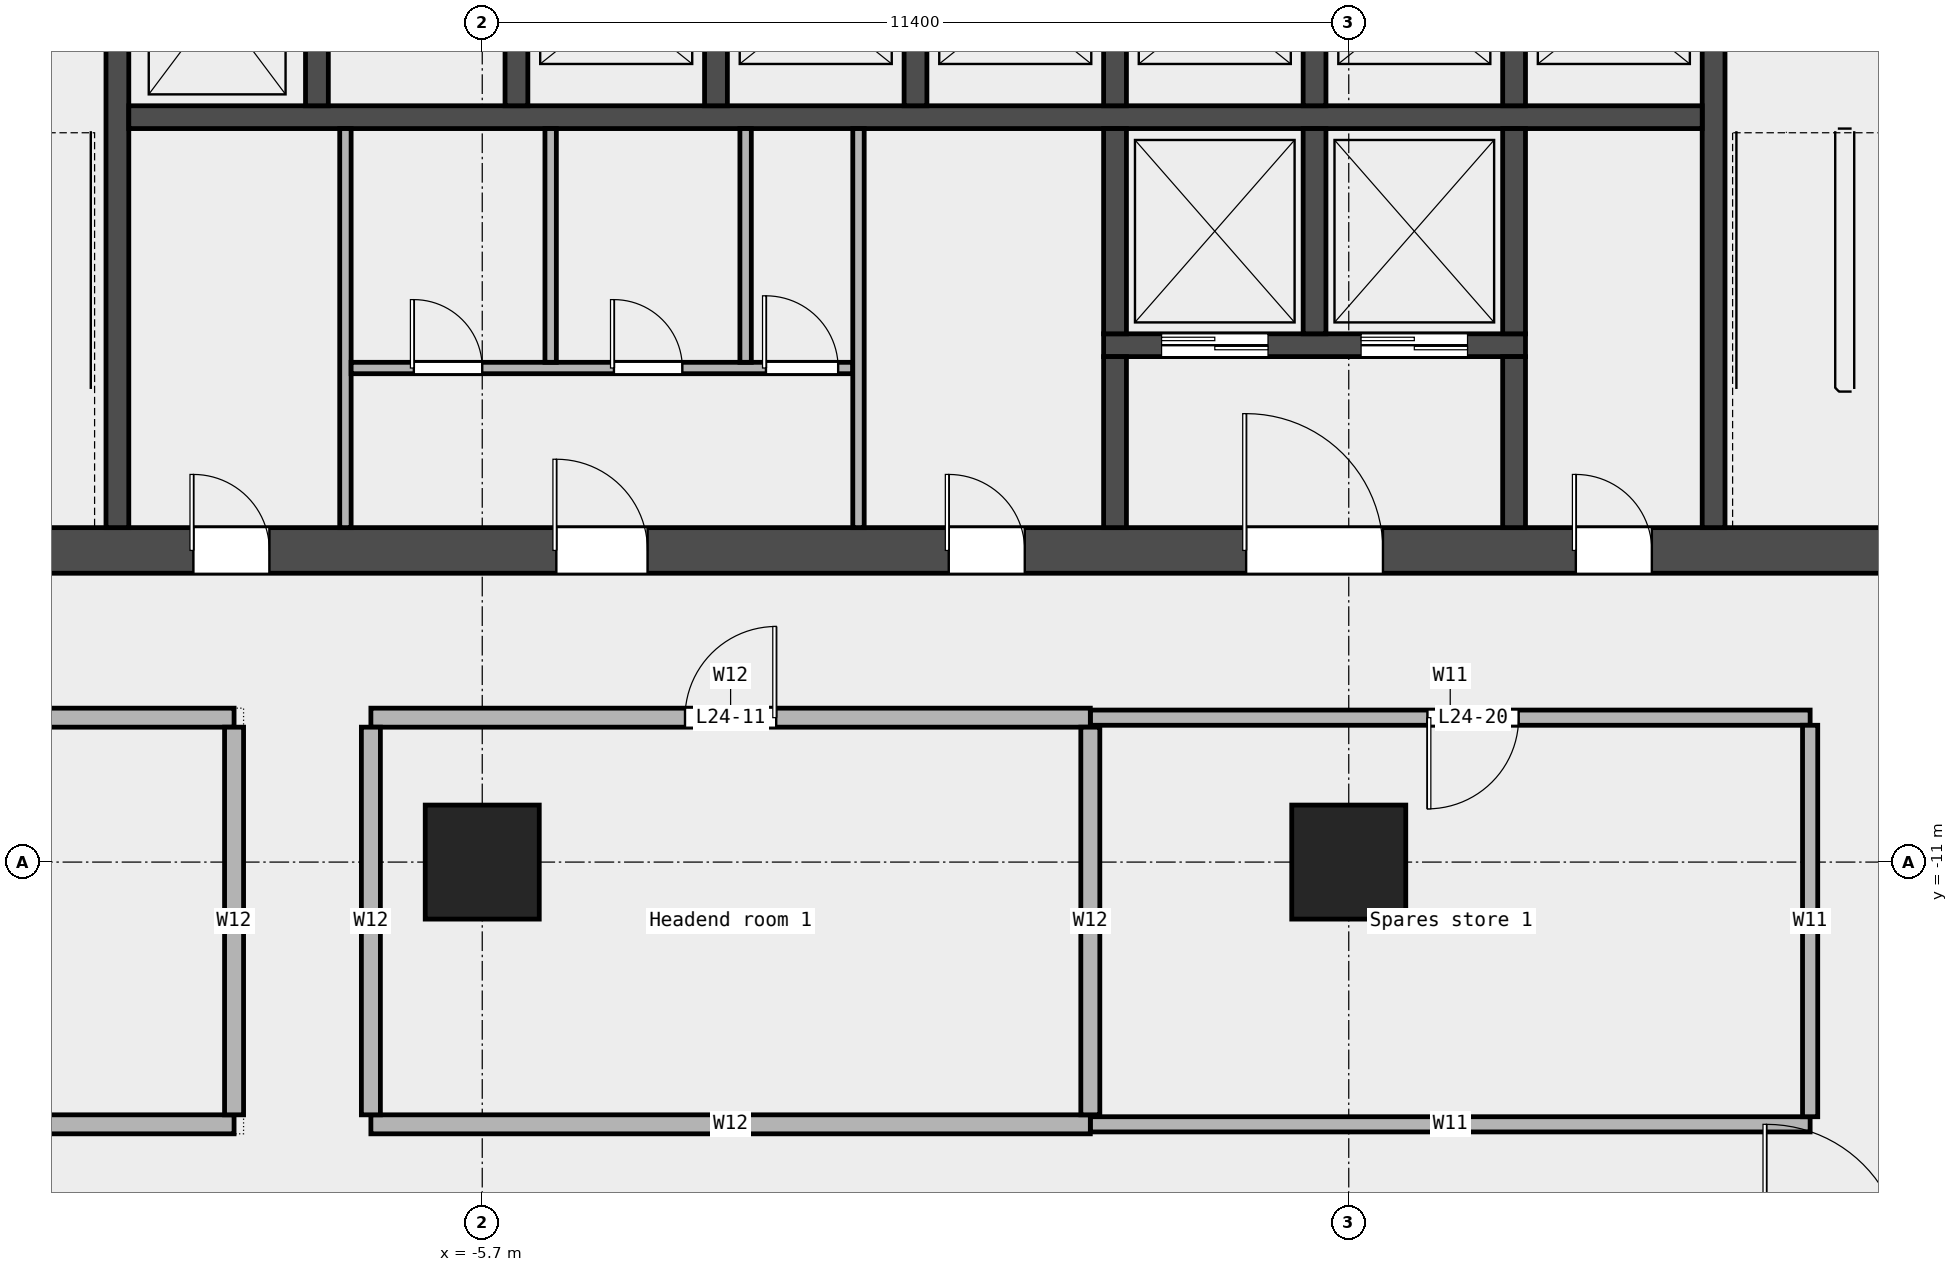
"""IFC4 building model, lengths in metres.
Left out: names, types, materials, properties, quantities, classifications, styles, units other than length and angle.
Written with IfcOpenShell. Run it as: python <this file> out.ifc"""

import sys

from ifc_helpers import new_model, si_unit, direction, frame, frame_2d, origin, origin_2d, place, context, subcontext, project, spatial, rectangle, extrude, element, fill, save


model = new_model("IFC4")
c1 = context("Model", 3, precision=1e-05, world=origin(), true_north=direction((0.0, 1.0)))
c2 = subcontext(c1, "Body", "Model", "MODEL_VIEW")
j1 = project(units=[si_unit("LENGTHUNIT", "METRE"), si_unit("PLANEANGLEUNIT", "RADIAN")], contexts=[c1])
p1 = place(None, origin())
s1 = spatial("IfcSite", under=j1, at=p1, CompositionType="ELEMENT")
p2 = place(p1, origin())
s2 = spatial("IfcBuilding", under=s1, at=p2, CompositionType="ELEMENT")
p3 = place(p2, frame((0.0, 0.0, 121.6)))
s3 = spatial("IfcBuildingStorey", under=s2, at=p3, CompositionType="ELEMENT", Elevation=121.6)
for number, where, z_axis, x_axis in (
    (1, (-5.7, -11.0, 0.0), (0.0, 0.0, 1.0), (1.0, 0.0, 0.0)),
    (2, (5.7, -11.0, 0.0), (0.0, 0.0, 1.0), (1.0, 0.0, 0.0)),
):
    element("IfcColumn", number, at=place(p3, frame(where, z_axis=z_axis, x_axis=x_axis)), inside=s3, PredefinedType="COLUMN", context=c2, shape_type="SweptSolid", body=[
        extrude(rectangle(XDim=1.5, YDim=1.5, at=origin_2d()), origin(), (0.0, 0.0, 1.0), 4.05),
    ])
p4 = place(p3, frame((2.3, -14.45, 0.0), z_axis=(0.0, 0.0, 1.0), x_axis=(1.0, 0.0, 0.0)))
e3 = element("IfcWall", 3, at=p4, inside=s3, PredefinedType="PARTITIONING", context=c2, shape_type="SweptSolid", body=[
    extrude(rectangle(XDim=9.47, YDim=0.2, at=frame_2d((4.735, 0.0))), origin(), (0.0, 0.0, 1.0), 4.05),
])
p5 = place(p3, frame((-15.9, -14.45, 0.0), z_axis=(0.0, 0.0, 1.0), x_axis=(1.0, 0.0, 0.0)))
e4 = element("IfcWall", 4, at=p5, inside=s3, PredefinedType="PARTITIONING", context=c2, shape_type="SweptSolid", body=[
    extrude(rectangle(XDim=6.935, YDim=0.25, at=frame_2d((3.467, 0.0))), origin(), (0.0, 0.0, 1.0), 4.05),
])
p6 = place(p3, frame((-7.165, -14.45, 0.0), z_axis=(0.0, 0.0, 1.0), x_axis=(1.0, 0.0, 0.0)))
e5 = element("IfcWall", 5, at=p6, inside=s3, PredefinedType="PARTITIONING", context=c2, shape_type="SweptSolid", body=[
    extrude(rectangle(XDim=9.465, YDim=0.25, at=frame_2d((4.732, 0.0))), origin(), (0.0, 0.0, 1.0), 4.05),
])
p7 = place(p3, frame((2.3, -9.1, 0.0), z_axis=(0.0, 0.0, 1.0), x_axis=(1.0, 0.0, 0.0)))
e6 = element("IfcWall", 6, at=p7, inside=s3, PredefinedType="PARTITIONING", context=c2, shape_type="SweptSolid", body=[
    extrude(rectangle(XDim=9.47, YDim=0.2, at=frame_2d((4.735, 0.0))), origin(), (0.0, 0.0, 1.0), 4.05),
])
p8 = place(p7, frame((4.435, 0.0, 0.0)))
e7 = element("IfcOpeningElement", 7, at=p8, cuts=e6, PredefinedType="OPENING", context=c2, shape_type="SweptSolid", body=[
    extrude(rectangle(XDim=1.2, YDim=2.1, at=frame_2d((0.6, 1.05))), frame((0.0, 0.112, 0.0), z_axis=(0.0, -1.0, 0.0), x_axis=(1.0, 0.0, 0.0)), (0.0, 0.0, 1.0), 0.224),
])
p9 = place(p3, frame((-15.9, -9.1, 0.0), z_axis=(0.0, 0.0, 1.0), x_axis=(1.0, 0.0, 0.0)))
e8 = element("IfcWall", 8, at=p9, inside=s3, PredefinedType="PARTITIONING", context=c2, shape_type="SweptSolid", body=[
    extrude(rectangle(XDim=6.935, YDim=0.25, at=frame_2d((3.467, 0.0))), origin(), (0.0, 0.0, 1.0), 4.05),
])
p10 = place(p9, frame((3.018, 0.0, 0.0)))
e9 = element("IfcOpeningElement", 9, at=p10, cuts=e8, PredefinedType="OPENING", context=c2, shape_type="SweptSolid", body=[
    extrude(rectangle(XDim=0.9, YDim=2.1, at=frame_2d((0.45, 1.05))), frame((0.0, 0.137, 0.0), z_axis=(0.0, -1.0, 0.0), x_axis=(1.0, 0.0, 0.0)), (0.0, 0.0, 1.0), 0.274),
])
p11 = place(p3, frame((-7.165, -9.1, 0.0), z_axis=(0.0, 0.0, 1.0), x_axis=(1.0, 0.0, 0.0)))
e10 = element("IfcWall", 10, at=p11, inside=s3, PredefinedType="PARTITIONING", context=c2, shape_type="SweptSolid", body=[
    extrude(rectangle(XDim=9.465, YDim=0.25, at=frame_2d((4.732, 0.0))), origin(), (0.0, 0.0, 1.0), 4.05),
])
p12 = place(p11, frame((4.133, 0.0, 0.0)))
e11 = element("IfcOpeningElement", 11, at=p12, cuts=e10, PredefinedType="OPENING", context=c2, shape_type="SweptSolid", body=[
    extrude(rectangle(XDim=1.2, YDim=2.1, at=frame_2d((0.6, 1.05))), frame((0.0, 0.137, 0.0), z_axis=(0.0, -1.0, 0.0), x_axis=(1.0, 0.0, 0.0)), (0.0, 0.0, 1.0), 0.274),
])
for number, where, z_axis, x_axis in (
    (12, (-8.965, -14.325, 0.0), (0.0, 0.0, 1.0), (0.0, 1.0, 0.0)),
    (13, (-7.165, -14.325, 0.0), (0.0, 0.0, 1.0), (0.0, 1.0, 0.0)),
    (14, (2.3, -14.325, 0.0), (0.0, 0.0, 1.0), (0.0, 1.0, 0.0)),
):
    element("IfcWall", number, at=place(p3, frame(where, z_axis=z_axis, x_axis=x_axis)), inside=s3, PredefinedType="PARTITIONING", context=c2, shape_type="SweptSolid", body=[
        extrude(rectangle(XDim=5.1, YDim=0.25, at=frame_2d((2.55, 0.0))), origin(), (0.0, 0.0, 1.0), 4.05),
    ])
p13 = place(p3, frame((11.77, -14.35, 0.0), z_axis=(0.0, 0.0, 1.0), x_axis=(0.0, 1.0, 0.0)))
e15 = element("IfcWall", 15, at=p13, inside=s3, PredefinedType="PARTITIONING", context=c2, shape_type="SweptSolid", body=[
    extrude(rectangle(XDim=5.15, YDim=0.2, at=frame_2d((2.575, 0.0))), origin(), (0.0, 0.0, 1.0), 4.05),
])
p14 = place(p3, frame((-14.4, -6.9, 0.0), z_axis=(0.0, 0.0, 1.0), x_axis=(1.0, 0.0, 0.0)))
e16 = element("IfcWall", 16, at=p14, inside=s3, PredefinedType="SHEAR", context=c2, shape_type="SweptSolid", body=[
    extrude(rectangle(XDim=28.8, YDim=0.6, at=frame_2d((14.4, 0.0))), origin(), (0.0, 0.0, 1.0), 4.2),
])
p15 = place(p14, frame((4.9, 0.0, 0.0)))
e17 = element("IfcOpeningElement", 17, at=p15, cuts=e16, PredefinedType="OPENING", context=c2, shape_type="SweptSolid", body=[
    extrude(rectangle(XDim=1.0, YDim=2.1, at=frame_2d((0.5, 1.05))), frame((0.0, 0.312, 0.0), z_axis=(0.0, -1.0, 0.0), x_axis=(1.0, 0.0, 0.0)), (0.0, 0.0, 1.0), 0.624),
])
p16 = place(p14, frame((9.675, 0.0, 0.0)))
e18 = element("IfcOpeningElement", 18, at=p16, cuts=e16, PredefinedType="OPENING", context=c2, shape_type="SweptSolid", body=[
    extrude(rectangle(XDim=1.2, YDim=2.1, at=frame_2d((0.6, 1.05))), frame((0.0, 0.312, 0.0), z_axis=(0.0, -1.0, 0.0), x_axis=(1.0, 0.0, 0.0)), (0.0, 0.0, 1.0), 0.624),
])
p17 = place(p14, frame((14.837, 0.0, 0.0)))
e19 = element("IfcOpeningElement", 19, at=p17, cuts=e16, PredefinedType="OPENING", context=c2, shape_type="SweptSolid", body=[
    extrude(rectangle(XDim=1.0, YDim=2.1, at=frame_2d((0.5, 1.05))), frame((0.0, 0.312, 0.0), z_axis=(0.0, -1.0, 0.0), x_axis=(1.0, 0.0, 0.0)), (0.0, 0.0, 1.0), 0.624),
])
p18 = place(p14, frame((18.75, 0.0, 0.0)))
e20 = element("IfcOpeningElement", 20, at=p18, cuts=e16, PredefinedType="OPENING", context=c2, shape_type="SweptSolid", body=[
    extrude(rectangle(XDim=1.8, YDim=2.1, at=frame_2d((0.9, 1.05))), frame((0.0, 0.312, 0.0), z_axis=(0.0, -1.0, 0.0), x_axis=(1.0, 0.0, 0.0)), (0.0, 0.0, 1.0), 0.624),
])
p19 = place(p14, frame((23.087, 0.0, 0.0)))
e21 = element("IfcOpeningElement", 21, at=p19, cuts=e16, PredefinedType="OPENING", context=c2, shape_type="SweptSolid", body=[
    extrude(rectangle(XDim=1.0, YDim=2.1, at=frame_2d((0.5, 1.05))), frame((0.0, 0.312, 0.0), z_axis=(0.0, -1.0, 0.0), x_axis=(1.0, 0.0, 0.0)), (0.0, 0.0, 1.0), 0.624),
])
for number, where, z_axis, x_axis in (
    (22, (-10.5, -6.6, 0.0), (0.0, 0.0, 1.0), (0.0, 1.0, 0.0)),
    (23, (10.5, -6.6, 0.0), (0.0, 0.0, 1.0), (0.0, 1.0, 0.0)),
):
    element("IfcWall", number, at=place(p3, frame(where, z_axis=z_axis, x_axis=x_axis)), inside=s3, PredefinedType="SHEAR", context=c2, shape_type="SweptSolid", body=[
        extrude(rectangle(XDim=8.55, YDim=0.3, at=frame_2d((4.275, 0.0))), origin(), (0.0, 0.0, 1.0), 4.2),
    ])
p20 = place(p3, frame((-10.35, -1.2, 0.0), z_axis=(0.0, 0.0, 1.0), x_axis=(1.0, 0.0, 0.0)))
e24 = element("IfcWall", 24, at=p20, inside=s3, PredefinedType="SOLIDWALL", context=c2, shape_type="SweptSolid", body=[
    extrude(rectangle(XDim=20.7, YDim=0.3, at=frame_2d((10.35, 0.0))), origin(), (0.0, 0.0, 1.0), 4.2),
])
for number, where, z_axis, x_axis in (
    (25, (-7.875, -1.05, 0.0), (0.0, 0.0, 1.0), (0.0, 1.0, 0.0)),
    (26, (-5.25, -1.05, 0.0), (0.0, 0.0, 1.0), (0.0, 1.0, 0.0)),
    (27, (-2.625, -1.05, 0.0), (0.0, 0.0, 1.0), (0.0, 1.0, 0.0)),
    (28, (0.0, -1.05, 0.0), (0.0, 0.0, 1.0), (0.0, 1.0, 0.0)),
    (29, (2.625, -1.05, 0.0), (0.0, 0.0, 1.0), (0.0, 1.0, 0.0)),
    (30, (5.25, -1.05, 0.0), (0.0, 0.0, 1.0), (0.0, 1.0, 0.0)),
    (31, (7.875, -1.05, 0.0), (0.0, 0.0, 1.0), (0.0, 1.0, 0.0)),
):
    element("IfcWall", number, at=place(p3, frame(where, z_axis=z_axis, x_axis=x_axis)), inside=s3, PredefinedType="SOLIDWALL", context=c2, shape_type="SweptSolid", body=[
        extrude(rectangle(XDim=2.7, YDim=0.3, at=frame_2d((1.35, 0.0))), origin(), (0.0, 0.0, 1.0), 4.2),
    ])
p21 = place(p3, frame((2.475, -4.2, 0.0), z_axis=(0.0, 0.0, 1.0), x_axis=(1.0, 0.0, 0.0)))
e32 = element("IfcWall", 32, at=p21, inside=s3, PredefinedType="SOLIDWALL", context=c2, shape_type="SweptSolid", body=[
    extrude(rectangle(XDim=5.55, YDim=0.3, at=frame_2d((2.775, 0.0))), origin(), (0.0, 0.0, 1.0), 4.2),
])
p22 = place(p21, frame((0.762, 0.0, 0.0)))
e33 = element("IfcOpeningElement", 33, at=p22, cuts=e32, PredefinedType="OPENING", context=c2, shape_type="SweptSolid", body=[
    extrude(rectangle(XDim=1.4, YDim=2.1, at=frame_2d((0.7, 1.05))), frame((0.0, 0.162, 0.0), z_axis=(0.0, -1.0, 0.0), x_axis=(1.0, 0.0, 0.0)), (0.0, 0.0, 1.0), 0.324),
])
p23 = place(p21, frame((3.387, 0.0, 0.0)))
e34 = element("IfcOpeningElement", 34, at=p23, cuts=e32, PredefinedType="OPENING", context=c2, shape_type="SweptSolid", body=[
    extrude(rectangle(XDim=1.4, YDim=2.1, at=frame_2d((0.7, 1.05))), frame((0.0, 0.162, 0.0), z_axis=(0.0, -1.0, 0.0), x_axis=(1.0, 0.0, 0.0)), (0.0, 0.0, 1.0), 0.324),
])
p24 = place(p3, frame((2.625, -4.05, 0.0), z_axis=(0.0, 0.0, 1.0), x_axis=(0.0, 1.0, 0.0)))
e35 = element("IfcWall", 35, at=p24, inside=s3, PredefinedType="SOLIDWALL", context=c2, shape_type="SweptSolid", body=[
    extrude(rectangle(XDim=2.7, YDim=0.3, at=frame_2d((1.35, 0.0))), origin(), (0.0, 0.0, 1.0), 4.2),
])
p25 = place(p3, frame((2.625, -6.6, 0.0), z_axis=(0.0, 0.0, 1.0), x_axis=(0.0, 1.0, 0.0)))
e36 = element("IfcWall", 36, at=p25, inside=s3, PredefinedType="SOLIDWALL", context=c2, shape_type="SweptSolid", body=[
    extrude(rectangle(XDim=2.25, YDim=0.3, at=frame_2d((1.125, 0.0))), origin(), (0.0, 0.0, 1.0), 4.2),
])
for number, where, z_axis, x_axis in (
    (37, (5.25, -4.05, 0.0), (0.0, 0.0, 1.0), (0.0, 1.0, 0.0)),
    (38, (7.875, -4.05, 0.0), (0.0, 0.0, 1.0), (0.0, 1.0, 0.0)),
):
    element("IfcWall", number, at=place(p3, frame(where, z_axis=z_axis, x_axis=x_axis)), inside=s3, PredefinedType="SOLIDWALL", context=c2, shape_type="SweptSolid", body=[
        extrude(rectangle(XDim=2.7, YDim=0.3, at=frame_2d((1.35, 0.0))), origin(), (0.0, 0.0, 1.0), 4.2),
    ])
p26 = place(p3, frame((7.875, -6.6, 0.0), z_axis=(0.0, 0.0, 1.0), x_axis=(0.0, 1.0, 0.0)))
e39 = element("IfcWall", 39, at=p26, inside=s3, PredefinedType="SOLIDWALL", context=c2, shape_type="SweptSolid", body=[
    extrude(rectangle(XDim=2.25, YDim=0.3, at=frame_2d((1.125, 0.0))), origin(), (0.0, 0.0, 1.0), 4.2),
])
p27 = place(p3, frame((-7.5, -6.6, 0.0), z_axis=(0.0, 0.0, 1.0), x_axis=(0.0, 1.0, 0.0)))
e40 = element("IfcWall", 40, at=p27, inside=s3, PredefinedType="PARTITIONING", context=c2, shape_type="SweptSolid", body=[
    extrude(rectangle(XDim=5.25, YDim=0.15, at=frame_2d((2.625, 0.0))), origin(), (0.0, 0.0, 1.0), 4.2),
])
p28 = place(p3, frame((-7.425, -4.5, 0.0), z_axis=(0.0, 0.0, 1.0), x_axis=(1.0, 0.0, 0.0)))
e41 = element("IfcWall", 41, at=p28, inside=s3, PredefinedType="PARTITIONING", context=c2, shape_type="SweptSolid", body=[
    extrude(rectangle(XDim=6.6, YDim=0.15, at=frame_2d((3.3, 0.0))), origin(), (0.0, 0.0, 1.0), 4.2),
])
p29 = place(p28, frame((0.825, 0.0, 0.0)))
e42 = element("IfcOpeningElement", 42, at=p29, cuts=e41, PredefinedType="OPENING", context=c2, shape_type="SweptSolid", body=[
    extrude(rectangle(XDim=0.9, YDim=2.1, at=frame_2d((0.45, 1.05))), frame((0.0, 0.087, 0.0), z_axis=(0.0, -1.0, 0.0), x_axis=(1.0, 0.0, 0.0)), (0.0, 0.0, 1.0), 0.174),
])
p30 = place(p28, frame((3.458, 0.0, 0.0)))
e43 = element("IfcOpeningElement", 43, at=p30, cuts=e41, PredefinedType="OPENING", context=c2, shape_type="SweptSolid", body=[
    extrude(rectangle(XDim=0.9, YDim=2.1, at=frame_2d((0.45, 1.05))), frame((0.0, 0.087, 0.0), z_axis=(0.0, -1.0, 0.0), x_axis=(1.0, 0.0, 0.0)), (0.0, 0.0, 1.0), 0.174),
])
p31 = place(p28, frame((5.458, 0.0, 0.0)))
e44 = element("IfcOpeningElement", 44, at=p31, cuts=e41, PredefinedType="OPENING", context=c2, shape_type="SweptSolid", body=[
    extrude(rectangle(XDim=0.95, YDim=2.1, at=frame_2d((0.475, 1.05))), frame((0.0, 0.087, 0.0), z_axis=(0.0, -1.0, 0.0), x_axis=(1.0, 0.0, 0.0)), (0.0, 0.0, 1.0), 0.174),
])
for number, where, z_axis, x_axis in (
    (45, (-4.8, -4.425, 0.0), (0.0, 0.0, 1.0), (0.0, 1.0, 0.0)),
    (46, (-2.235, -4.425, 0.0), (0.0, 0.0, 1.0), (0.0, 1.0, 0.0)),
):
    element("IfcWall", number, at=place(p3, frame(where, z_axis=z_axis, x_axis=x_axis)), inside=s3, PredefinedType="PARTITIONING", context=c2, shape_type="SweptSolid", body=[
        extrude(rectangle(XDim=3.075, YDim=0.15, at=frame_2d((1.538, 0.0))), origin(), (0.0, 0.0, 1.0), 4.2),
    ])
p32 = place(p3, frame((-0.75, -6.6, 0.0), z_axis=(0.0, 0.0, 1.0), x_axis=(0.0, 1.0, 0.0)))
e47 = element("IfcWall", 47, at=p32, inside=s3, PredefinedType="PARTITIONING", context=c2, shape_type="SweptSolid", body=[
    extrude(rectangle(XDim=5.25, YDim=0.15, at=frame_2d((2.625, 0.0))), origin(), (0.0, 0.0, 1.0), 4.2),
])
p33 = place(p12, origin())
e48 = element("IfcDoor", 48, at=p33, inside=s3, OperationType="SINGLE_SWING_RIGHT", PredefinedType="DOOR", context=c2, shape_type="SweptSolid", body=[
    extrude(rectangle(XDim=1.2, YDim=2.1, at=frame_2d((0.6, 1.05))), frame((0.0, 0.025, 0.0), z_axis=(0.0, -1.0, 0.0), x_axis=(1.0, 0.0, 0.0)), (0.0, 0.0, 1.0), 0.05),
])
fill(e11, e48)
p34 = place(p8, origin())
e49 = element("IfcDoor", 49, at=p34, inside=s3, OperationType="SINGLE_SWING_RIGHT", PredefinedType="DOOR", context=c2, shape_type="SweptSolid", body=[
    extrude(rectangle(XDim=1.2, YDim=2.1, at=frame_2d((0.6, 1.05))), frame((0.0, 0.025, 0.0), z_axis=(0.0, -1.0, 0.0), x_axis=(1.0, 0.0, 0.0)), (0.0, 0.0, 1.0), 0.05),
])
fill(e7, e49)
p35 = place(p22, origin())
e50 = element("IfcDoor", 50, at=p35, inside=s3, OperationType="DOUBLE_DOOR_SLIDING", PredefinedType="DOOR", context=c2, shape_type="SweptSolid", body=[
    extrude(rectangle(XDim=1.4, YDim=2.1, at=frame_2d((0.7, 1.05))), frame((0.0, 0.025, 0.0), z_axis=(0.0, -1.0, 0.0), x_axis=(1.0, 0.0, 0.0)), (0.0, 0.0, 1.0), 0.05),
])
fill(e33, e50)
p36 = place(p23, origin())
e51 = element("IfcDoor", 51, at=p36, inside=s3, OperationType="DOUBLE_DOOR_SLIDING", PredefinedType="DOOR", context=c2, shape_type="SweptSolid", body=[
    extrude(rectangle(XDim=1.4, YDim=2.1, at=frame_2d((0.7, 1.05))), frame((0.0, 0.025, 0.0), z_axis=(0.0, -1.0, 0.0), x_axis=(1.0, 0.0, 0.0)), (0.0, 0.0, 1.0), 0.05),
])
fill(e34, e51)
p37 = place(p15, origin())
e52 = element("IfcDoor", 52, at=p37, inside=s3, OperationType="SINGLE_SWING_LEFT", PredefinedType="DOOR", context=c2, shape_type="SweptSolid", body=[
    extrude(rectangle(XDim=1.0, YDim=2.1, at=frame_2d((0.5, 1.05))), frame((0.0, 0.025, 0.0), z_axis=(0.0, -1.0, 0.0), x_axis=(1.0, 0.0, 0.0)), (0.0, 0.0, 1.0), 0.05),
])
fill(e17, e52)
p38 = place(p16, origin())
e53 = element("IfcDoor", 53, at=p38, inside=s3, OperationType="SINGLE_SWING_LEFT", PredefinedType="DOOR", context=c2, shape_type="SweptSolid", body=[
    extrude(rectangle(XDim=1.2, YDim=2.1, at=frame_2d((0.6, 1.05))), frame((0.0, 0.025, 0.0), z_axis=(0.0, -1.0, 0.0), x_axis=(1.0, 0.0, 0.0)), (0.0, 0.0, 1.0), 0.05),
])
fill(e18, e53)
p39 = place(p29, origin())
e54 = element("IfcDoor", 54, at=p39, inside=s3, OperationType="SINGLE_SWING_LEFT", PredefinedType="DOOR", context=c2, shape_type="SweptSolid", body=[
    extrude(rectangle(XDim=0.9, YDim=2.1, at=frame_2d((0.45, 1.05))), frame((0.0, 0.025, 0.0), z_axis=(0.0, -1.0, 0.0), x_axis=(1.0, 0.0, 0.0)), (0.0, 0.0, 1.0), 0.05),
])
fill(e42, e54)
p40 = place(p30, origin())
e55 = element("IfcDoor", 55, at=p40, inside=s3, OperationType="SINGLE_SWING_LEFT", PredefinedType="DOOR", context=c2, shape_type="SweptSolid", body=[
    extrude(rectangle(XDim=0.9, YDim=2.1, at=frame_2d((0.45, 1.05))), frame((0.0, 0.025, 0.0), z_axis=(0.0, -1.0, 0.0), x_axis=(1.0, 0.0, 0.0)), (0.0, 0.0, 1.0), 0.05),
])
fill(e43, e55)
p41 = place(p31, origin())
e56 = element("IfcDoor", 56, at=p41, inside=s3, OperationType="SINGLE_SWING_LEFT", PredefinedType="DOOR", context=c2, shape_type="SweptSolid", body=[
    extrude(rectangle(XDim=0.95, YDim=2.1, at=frame_2d((0.475, 1.05))), frame((0.0, 0.025, 0.0), z_axis=(0.0, -1.0, 0.0), x_axis=(1.0, 0.0, 0.0)), (0.0, 0.0, 1.0), 0.05),
])
fill(e44, e56)
p42 = place(p17, origin())
e57 = element("IfcDoor", 57, at=p42, inside=s3, OperationType="SINGLE_SWING_LEFT", PredefinedType="DOOR", context=c2, shape_type="SweptSolid", body=[
    extrude(rectangle(XDim=1.0, YDim=2.1, at=frame_2d((0.5, 1.05))), frame((0.0, 0.025, 0.0), z_axis=(0.0, -1.0, 0.0), x_axis=(1.0, 0.0, 0.0)), (0.0, 0.0, 1.0), 0.05),
])
fill(e19, e57)
p43 = place(p18, origin())
e58 = element("IfcDoor", 58, at=p43, inside=s3, OperationType="DOUBLE_DOOR_SINGLE_SWING", PredefinedType="DOOR", context=c2, shape_type="SweptSolid", body=[
    extrude(rectangle(XDim=1.8, YDim=2.1, at=frame_2d((0.9, 1.05))), frame((0.0, 0.025, 0.0), z_axis=(0.0, -1.0, 0.0), x_axis=(1.0, 0.0, 0.0)), (0.0, 0.0, 1.0), 0.05),
])
fill(e20, e58)
p44 = place(p19, origin())
e59 = element("IfcDoor", 59, at=p44, inside=s3, OperationType="SINGLE_SWING_LEFT", PredefinedType="DOOR", context=c2, shape_type="SweptSolid", body=[
    extrude(rectangle(XDim=1.0, YDim=2.1, at=frame_2d((0.5, 1.05))), frame((0.0, 0.025, 0.0), z_axis=(0.0, -1.0, 0.0), x_axis=(1.0, 0.0, 0.0)), (0.0, 0.0, 1.0), 0.05),
])
fill(e21, e59)
save(model, sys.argv[1])
